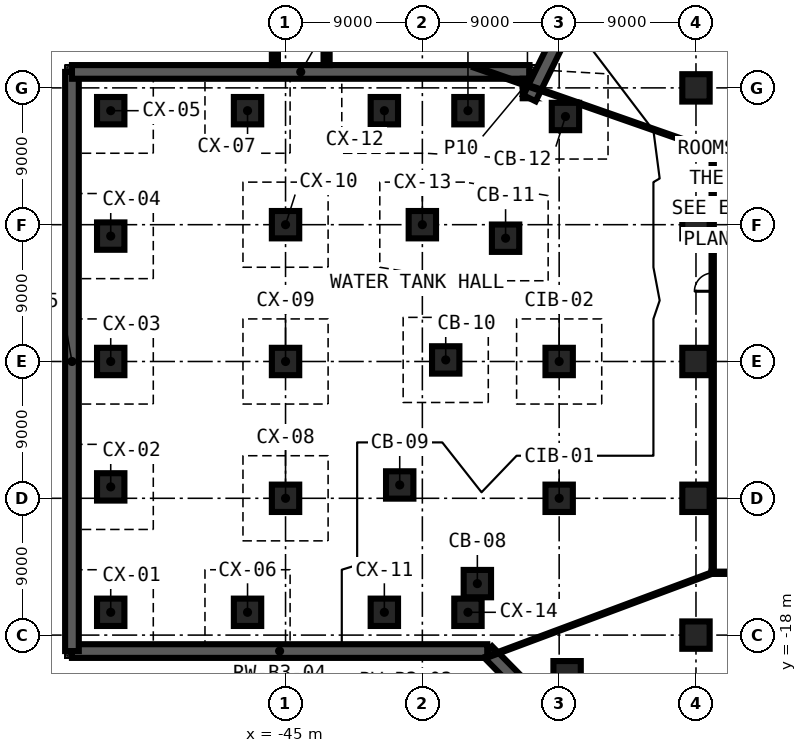
"""IFC4 building model, lengths in metres.
Left out: names, types, materials, properties, quantities, classifications, styles, units other than length and angle.
Written with IfcOpenShell. Run it as: python <this file> out.ifc"""

import sys

from ifc_helpers import new_model, si_unit, direction, frame, frame_2d, origin, origin_2d, place, context, subcontext, project, spatial, polyline, rectangle, outline, extrude, element, fill, save


model = new_model("IFC4")
c1 = context("Model", 3, precision=1e-05, world=origin(), true_north=direction((0.0, 1.0)))
c2 = subcontext(c1, "Body", "Model", "MODEL_VIEW")
j1 = project(units=[si_unit("LENGTHUNIT", "METRE"), si_unit("PLANEANGLEUNIT", "RADIAN")], contexts=[c1])
p1 = place(None, origin())
s1 = spatial("IfcSite", under=j1, at=p1, CompositionType="ELEMENT")
p2 = place(p1, origin())
s2 = spatial("IfcBuilding", under=s1, at=p2, CompositionType="ELEMENT")
p3 = place(p2, frame((0.0, 0.0, -17.0)))
s3 = spatial("IfcBuildingStorey", under=s2, at=p3, CompositionType="ELEMENT", Elevation=-17.0)
for number, where, z_axis, x_axis in (
    (1, (-26.478, -20.608, 0.0), (0.0, 0.0, 1.0), (1.0, 0.0, 0.0)),
    (2, (-32.382, -14.613, 0.0), (0.0, 0.0, 1.0), (1.0, 0.0, 0.0)),
    (3, (-37.489, -8.123, 0.0), (0.0, 0.0, 1.0), (1.0, 0.0, 0.0)),
    (4, (-34.463, 0.103, 0.0), (0.0, 0.0, 1.0), (1.0, 0.0, 0.0)),
    (5, (-30.525, 8.111, 0.0), (0.0, 0.0, 1.0), (1.0, 0.0, 0.0)),
    (6, (-26.586, 16.118, 0.0), (0.0, 0.0, 1.0), (1.0, 0.0, 0.0)),
    (7, (-27.0, -9.0, 0.0), (0.0, 0.0, 1.0), (1.0, 0.0, 0.0)),
    (8, (-27.0, 0.0, 0.0), (0.0, 0.0, 1.0), (1.0, 0.0, 0.0)),
    (9, (-18.0, -18.0, 0.0), (0.0, 0.0, 1.0), (1.0, 0.0, 0.0)),
    (10, (-18.0, -9.0, 0.0), (0.0, 0.0, 1.0), (1.0, 0.0, 0.0)),
    (11, (-18.0, 0.0, 0.0), (0.0, 0.0, 1.0), (1.0, 0.0, 0.0)),
    (12, (-18.0, 9.0, 0.0), (0.0, 0.0, 1.0), (1.0, 0.0, 0.0)),
    (13, (-18.0, 18.0, 0.0), (0.0, 0.0, 1.0), (1.0, 0.0, 0.0)),
    (14, (-56.5, -16.5, 0.0), (0.0, 0.0, 1.0), (1.0, 0.0, 0.0)),
    (15, (-56.5, -8.25, 0.0), (0.0, 0.0, 1.0), (1.0, 0.0, 0.0)),
    (16, (-56.5, 0.0, 0.0), (0.0, 0.0, 1.0), (1.0, 0.0, 0.0)),
    (17, (-56.5, 8.25, 0.0), (0.0, 0.0, 1.0), (1.0, 0.0, 0.0)),
    (18, (-56.5, 16.5, 0.0), (0.0, 0.0, 1.0), (1.0, 0.0, 0.0)),
    (19, (-47.5, -16.5, 0.0), (0.0, 0.0, 1.0), (1.0, 0.0, 0.0)),
    (20, (-47.5, 16.5, 0.0), (0.0, 0.0, 1.0), (1.0, 0.0, 0.0)),
    (21, (-45.0, -9.0, 0.0), (0.0, 0.0, 1.0), (1.0, 0.0, 0.0)),
    (22, (-45.0, 0.0, 0.0), (0.0, 0.0, 1.0), (1.0, 0.0, 0.0)),
    (23, (-45.0, 9.0, 0.0), (0.0, 0.0, 1.0), (1.0, 0.0, 0.0)),
    (24, (-38.5, -16.5, 0.0), (0.0, 0.0, 1.0), (1.0, 0.0, 0.0)),
    (25, (-38.5, 16.5, 0.0), (0.0, 0.0, 1.0), (1.0, 0.0, 0.0)),
    (26, (-36.0, 9.0, 0.0), (0.0, 0.0, 1.0), (1.0, 0.0, 0.0)),
    (27, (-33.0, -16.5, 0.0), (0.0, 0.0, 1.0), (1.0, 0.0, 0.0)),
    (28, (-33.0, 16.5, 0.0), (0.0, 0.0, 1.0), (1.0, 0.0, 0.0)),
):
    element("IfcColumn", number, at=place(p3, frame(where, z_axis=z_axis, x_axis=x_axis)), inside=s3, PredefinedType="COLUMN", context=c2, shape_type="SweptSolid", body=[
        extrude(rectangle(XDim=1.8, YDim=1.8, at=origin_2d()), origin(), (0.0, 0.0, 1.0), 5.1),
    ])
p4 = place(p3, frame((-27.89, -22.95, 0.0), z_axis=(0.0, 0.0, 1.0), x_axis=(-0.70171190232, 0.71246081025, 0.0)))
e29 = element("IfcWall", 29, at=p4, inside=s3, PredefinedType="SHEAR", context=c2, shape_type="SweptSolid", body=[
    extrude(rectangle(XDim=5.474, YDim=0.9, at=frame_2d((2.737, 0.0))), origin(), (0.0, 0.0, 1.0), 5.1),
])
p5 = place(p3, frame((-31.731, -19.05, 0.0), z_axis=(0.0, 0.0, 1.0), x_axis=(-1.0, 0.0, 0.0)))
e30 = element("IfcWall", 30, at=p5, inside=s3, PredefinedType="SHEAR", context=c2, shape_type="SweptSolid", body=[
    extrude(rectangle(XDim=27.319, YDim=0.9, at=frame_2d((13.659, 0.0))), origin(), (0.0, 0.0, 1.0), 5.1),
])
p6 = place(p3, frame((-59.05, -19.05, 0.0), z_axis=(0.0, 0.0, 1.0), x_axis=(0.0, 1.0, 0.0)))
e31 = element("IfcWall", 31, at=p6, inside=s3, PredefinedType="SHEAR", context=c2, shape_type="SweptSolid", body=[
    extrude(rectangle(XDim=38.1, YDim=0.9, at=frame_2d((19.05, 0.0))), origin(), (0.0, 0.0, 1.0), 5.1),
])
p7 = place(p3, frame((-59.05, 19.05, 0.0), z_axis=(0.0, 0.0, 1.0), x_axis=(1.0, 0.0, 0.0)))
e32 = element("IfcWall", 32, at=p7, inside=s3, PredefinedType="SHEAR", context=c2, shape_type="SweptSolid", body=[
    extrude(rectangle(XDim=30.1, YDim=0.9, at=frame_2d((15.05, 0.0))), origin(), (0.0, 0.0, 1.0), 5.1),
])
p8 = place(p3, origin())
e33 = element("IfcWall", 33, at=p8, inside=s3, PredefinedType="SHEAR", context=c2, shape_type="SweptSolid", body=[
    extrude(outline(polyline([(-29.4, 17.317), (-28.95, 17.317), (-29.354, 17.515), (-28.599, 19.05), (-28.95, 19.05), (-28.95, 18.6), (-29.4, 18.6), (-29.4, 17.317)])), origin(), (0.0, 0.0, 1.0), 5.1),
])
p9 = place(p3, frame((-28.95, 17.317, 0.0), z_axis=(0.0, 0.0, 1.0), x_axis=(0.441350917098, 0.897334590873, 0.0)))
e34 = element("IfcWall", 34, at=p9, inside=s3, PredefinedType="SHEAR", context=c2, shape_type="SweptSolid", body=[
    extrude(rectangle(XDim=15.567, YDim=0.9, at=frame_2d((7.783, 0.0))), origin(), (0.0, 0.0, 1.0), 5.1),
])
p10 = place(p3, frame((16.975, -13.9, 0.0), z_axis=(0.0, 0.0, 1.0), x_axis=(-1.0, 0.0, 0.0)))
e35 = element("IfcWall", 35, at=p10, inside=s3, PredefinedType="PARTITIONING", context=c2, shape_type="SweptSolid", body=[
    extrude(rectangle(XDim=33.95, YDim=0.15, at=frame_2d((16.975, 0.0))), origin(), (0.0, 0.0, 1.0), 5.1),
])
p11 = place(p10, frame((28.375, 0.0, 0.0)))
e36 = element("IfcOpeningElement", 36, at=p11, cuts=e35, PredefinedType="OPENING", context=c2, shape_type="SweptSolid", body=[
    extrude(rectangle(XDim=1.2, YDim=2.1, at=frame_2d((0.6, 1.05))), frame((0.0, 0.085, 0.0), z_axis=(0.0, -1.0, 0.0), x_axis=(1.0, 0.0, 0.0)), (0.0, 0.0, 1.0), 0.17),
])
p12 = place(p10, frame((15.475, 0.0, 0.0)))
e37 = element("IfcOpeningElement", 37, at=p12, cuts=e35, PredefinedType="OPENING", context=c2, shape_type="SweptSolid", body=[
    extrude(rectangle(XDim=1.2, YDim=2.1, at=frame_2d((0.6, 1.05))), frame((0.0, 0.085, 0.0), z_axis=(0.0, -1.0, 0.0), x_axis=(1.0, 0.0, 0.0)), (0.0, 0.0, 1.0), 0.17),
])
p13 = place(p3, frame((-16.975, 13.9, 0.0), z_axis=(0.0, 0.0, 1.0), x_axis=(1.0, 0.0, 0.0)))
e38 = element("IfcWall", 38, at=p13, inside=s3, PredefinedType="PARTITIONING", context=c2, shape_type="SweptSolid", body=[
    extrude(rectangle(XDim=33.95, YDim=0.15, at=frame_2d((16.975, 0.0))), origin(), (0.0, 0.0, 1.0), 5.1),
])
p14 = place(p13, frame((9.887, 0.0, 0.0)))
e39 = element("IfcOpeningElement", 39, at=p14, cuts=e38, PredefinedType="OPENING", context=c2, shape_type="SweptSolid", body=[
    extrude(rectangle(XDim=1.2, YDim=2.1, at=frame_2d((0.6, 1.05))), frame((0.0, 0.085, 0.0), z_axis=(0.0, -1.0, 0.0), x_axis=(1.0, 0.0, 0.0)), (0.0, 0.0, 1.0), 0.17),
])
p15 = place(p3, frame((-31.796, -19.454, 0.0), z_axis=(0.0, 0.0, 1.0), x_axis=(0.936976966906, 0.349391132526, 0.0)))
e40 = element("IfcWall", 40, at=p15, inside=s3, PredefinedType="PARTITIONING", context=c2, shape_type="SweptSolid", body=[
    extrude(rectangle(XDim=15.898, YDim=0.1, at=frame_2d((7.949, 0.0))), origin(), (0.0, 0.0, 1.0), 5.1),
])
p16 = place(p3, frame((-16.9, -13.825, 0.0), z_axis=(0.0, 0.0, 1.0), x_axis=(0.0, 1.0, 0.0)))
e41 = element("IfcWall", 41, at=p16, inside=s3, PredefinedType="PARTITIONING", context=c2, shape_type="SweptSolid", body=[
    extrude(rectangle(XDim=27.65, YDim=0.15, at=frame_2d((13.825, 0.0))), origin(), (0.0, 0.0, 1.0), 5.1),
])
p17 = place(p16, frame((18.445, 0.0, 0.0)))
e42 = element("IfcOpeningElement", 42, at=p17, cuts=e41, PredefinedType="OPENING", context=c2, shape_type="SweptSolid", body=[
    extrude(rectangle(XDim=1.2, YDim=2.1, at=frame_2d((0.6, 1.05))), frame((0.0, 0.085, 0.0), z_axis=(0.0, -1.0, 0.0), x_axis=(1.0, 0.0, 0.0)), (0.0, 0.0, 1.0), 0.17),
])
p18 = place(p3, frame((-32.585, 19.38, 0.0), z_axis=(0.0, 0.0, 1.0), x_axis=(0.944040530472, -0.329829466279, 0.0)))
e43 = element("IfcWall", 43, at=p18, inside=s3, PredefinedType="PARTITIONING", context=c2, shape_type="SweptSolid", body=[
    extrude(rectangle(XDim=7.161, YDim=0.1, at=frame_2d((3.58, 0.0))), origin(), (0.0, 0.0, 1.0), 5.1),
])
p19 = place(p3, frame((-25.686, 16.969, 0.0), z_axis=(0.0, 0.0, 1.0), x_axis=(0.944025503462, -0.329872473561, 0.0)))
e44 = element("IfcWall", 44, at=p19, inside=s3, PredefinedType="PARTITIONING", context=c2, shape_type="SweptSolid", body=[
    extrude(rectangle(XDim=9.307, YDim=0.1, at=frame_2d((4.653, 0.0))), origin(), (0.0, 0.0, 1.0), 5.1),
])
p20 = place(p2, origin())
s4 = spatial("IfcBuildingStorey", under=s2, at=p20, CompositionType="ELEMENT", Elevation=0.0)
for number, where, z_axis, x_axis in (
    (45, (-45.7, 19.5, -17.0), (0.0, 0.0, 1.0), (0.0, 1.0, 0.0)),
    (46, (-42.3, 19.5, -17.0), (0.0, 0.0, 1.0), (0.0, 1.0, 0.0)),
):
    element("IfcWall", number, at=place(p20, frame(where, z_axis=z_axis, x_axis=x_axis)), inside=s4, PredefinedType="SHEAR", context=c2, shape_type="SweptSolid", body=[
        extrude(rectangle(XDim=8.6, YDim=0.4, at=frame_2d((4.3, 0.0))), origin(), (0.0, 0.0, 1.0), 16.7),
    ])
p21 = place(p17, origin())
e47 = element("IfcDoor", 47, at=p21, inside=s3, OperationType="SINGLE_SWING_RIGHT", PredefinedType="DOOR", context=c2, shape_type="SweptSolid", body=[
    extrude(rectangle(XDim=1.2, YDim=2.1, at=frame_2d((0.6, 1.05))), frame((0.0, 0.025, 0.0), z_axis=(0.0, -1.0, 0.0), x_axis=(1.0, 0.0, 0.0)), (0.0, 0.0, 1.0), 0.05),
])
fill(e42, e47)
save(model, sys.argv[1])
